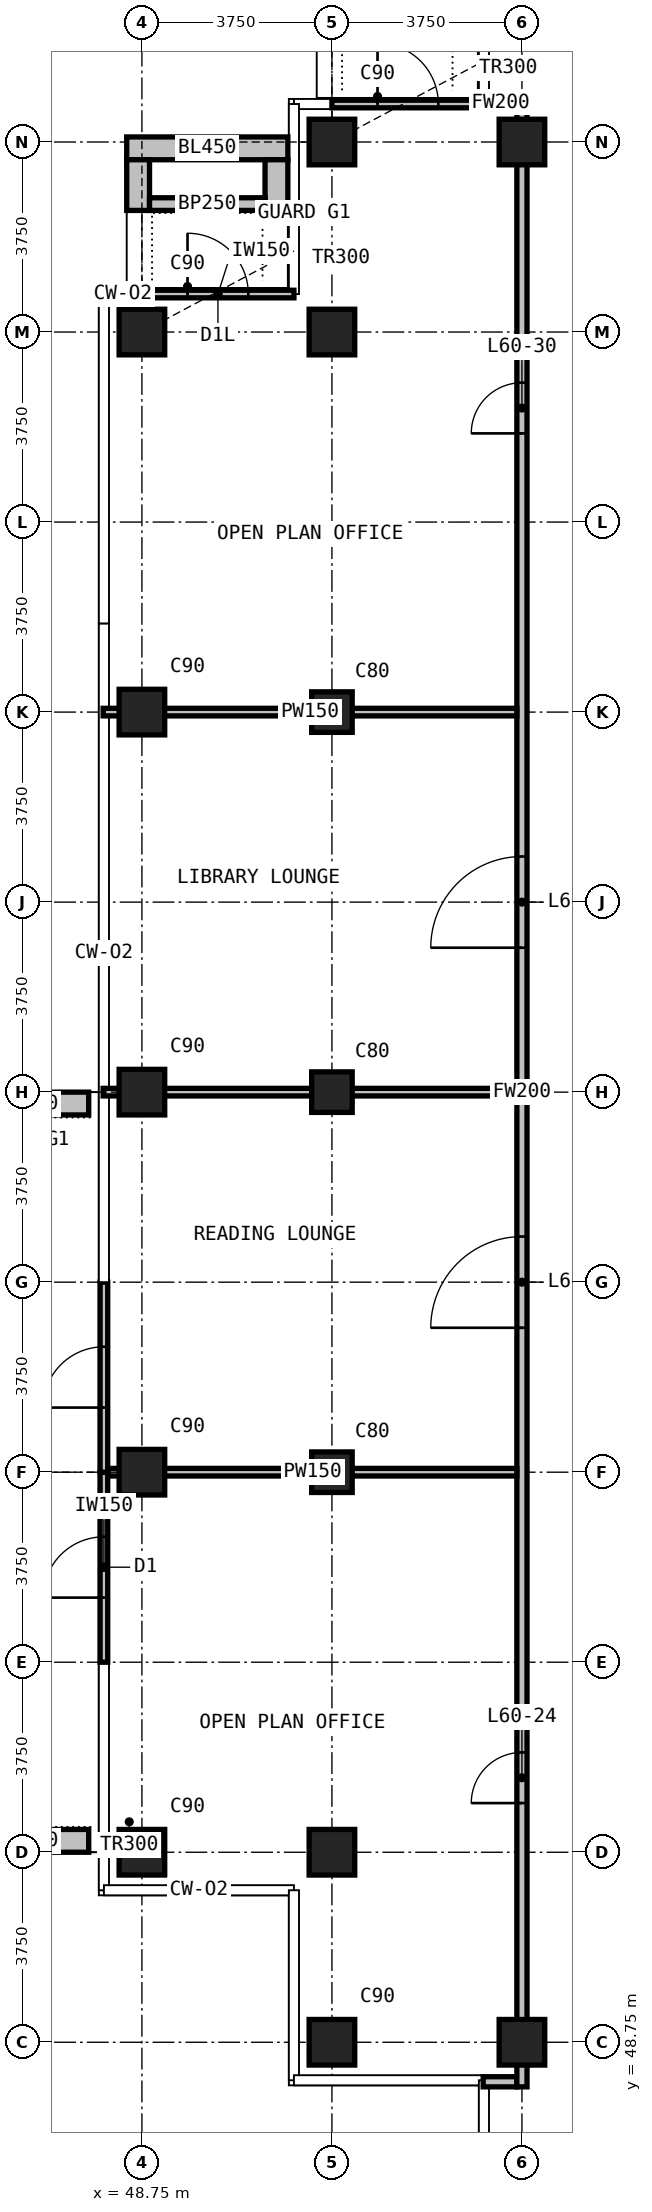
"""IFC4 building model, lengths in metres.
Left out: names, types, materials, properties, quantities, classifications, styles, units other than length and angle.
Written with IfcOpenShell. Run it as: python <this file> out.ifc"""

import sys

from ifc_helpers import new_model, si_unit, direction, frame, frame_2d, origin, origin_2d, place, context, subcontext, project, spatial, rectangle, extrude, element, fill, save


model = new_model("IFC4")
c1 = context("Model", 3, precision=1e-05, world=origin(), true_north=direction((0.0, 1.0)))
c2 = subcontext(c1, "Body", "Model", "MODEL_VIEW")
j1 = project(units=[si_unit("LENGTHUNIT", "METRE"), si_unit("PLANEANGLEUNIT", "RADIAN")], contexts=[c1])
p1 = place(None, origin())
s1 = spatial("IfcSite", under=j1, at=p1, CompositionType="ELEMENT")
p2 = place(p1, origin())
s2 = spatial("IfcBuilding", under=s1, at=p2, CompositionType="ELEMENT")
p3 = place(p2, frame((0.0, 0.0, 231.9)))
s3 = spatial("IfcBuildingStorey", under=s2, at=p3, CompositionType="ELEMENT", Elevation=231.9)
for number, where, z_axis, x_axis in (
    (1, (48.75, 52.5, 0.0), (0.0, 0.0, 1.0), (1.0, 0.0, 0.0)),
    (2, (48.75, 60.0, 0.0), (0.0, 0.0, 1.0), (1.0, 0.0, 0.0)),
    (3, (48.75, 67.5, 0.0), (0.0, 0.0, 1.0), (1.0, 0.0, 0.0)),
    (4, (48.75, 75.0, 0.0), (0.0, 0.0, 1.0), (1.0, 0.0, 0.0)),
    (5, (48.75, 82.5, 0.0), (0.0, 0.0, 1.0), (1.0, 0.0, 0.0)),
    (6, (52.5, 48.75, 0.0), (0.0, 0.0, 1.0), (1.0, 0.0, 0.0)),
    (7, (52.5, 52.5, 0.0), (0.0, 0.0, 1.0), (1.0, 0.0, 0.0)),
):
    element("IfcColumn", number, at=place(p3, frame(where, z_axis=z_axis, x_axis=x_axis)), inside=s3, PredefinedType="COLUMN", context=c2, shape_type="SweptSolid", body=[
        extrude(rectangle(XDim=0.9, YDim=0.9, at=origin_2d()), origin(), (0.0, 0.0, 1.0), 3.6),
    ])
for number, where, z_axis, x_axis in (
    (8, (52.5, 60.0, 0.0), (0.0, 0.0, 1.0), (1.0, 0.0, 0.0)),
    (9, (52.5, 67.5, 0.0), (0.0, 0.0, 1.0), (1.0, 0.0, 0.0)),
    (10, (52.5, 75.0, 0.0), (0.0, 0.0, 1.0), (1.0, 0.0, 0.0)),
):
    element("IfcColumn", number, at=place(p3, frame(where, z_axis=z_axis, x_axis=x_axis)), inside=s3, PredefinedType="COLUMN", context=c2, shape_type="SweptSolid", body=[
        extrude(rectangle(XDim=0.8, YDim=0.8, at=origin_2d()), origin(), (0.0, 0.0, 1.0), 3.6),
    ])
for number, where, z_axis, x_axis in (
    (11, (52.5, 82.5, 0.0), (0.0, 0.0, 1.0), (1.0, 0.0, 0.0)),
    (12, (52.5, 86.25, 0.0), (0.0, 0.0, 1.0), (1.0, 0.0, 0.0)),
    (13, (56.25, 48.75, 0.0), (0.0, 0.0, 1.0), (1.0, 0.0, 0.0)),
    (14, (56.25, 86.25, 0.0), (0.0, 0.0, 1.0), (1.0, 0.0, 0.0)),
):
    element("IfcColumn", number, at=place(p3, frame(where, z_axis=z_axis, x_axis=x_axis)), inside=s3, PredefinedType="COLUMN", context=c2, shape_type="SweptSolid", body=[
        extrude(rectangle(XDim=0.9, YDim=0.9, at=origin_2d()), origin(), (0.0, 0.0, 1.0), 3.6),
    ])
p4 = place(p3, frame((52.5, 87.0, 0.0), z_axis=(0.0, 0.0, 1.0), x_axis=(1.0, 0.0, 0.0)))
e15 = element("IfcWall", 15, at=p4, inside=s3, PredefinedType="SOLIDWALL", context=c2, shape_type="SweptSolid", body=[
    extrude(rectangle(XDim=3.0, YDim=0.15, at=frame_2d((1.5, 0.0))), origin(), (0.0, 0.0, 1.0), 3.3),
])
p5 = place(p4, frame((0.9, 0.0, 0.0)))
e16 = element("IfcOpeningElement", 16, at=p5, cuts=e15, PredefinedType="OPENING", context=c2, shape_type="SweptSolid", body=[
    extrude(rectangle(XDim=1.2, YDim=2.0, at=frame_2d((0.6, 1.0))), frame((0.0, 0.085, 0.0), z_axis=(0.0, -1.0, 0.0), x_axis=(1.0, 0.0, 0.0)), (0.0, 0.0, 1.0), 0.17),
])
p6 = place(p3, frame((48.75, 83.25, 0.0), z_axis=(0.0, 0.0, 1.0), x_axis=(1.0, 0.0, 0.0)))
e17 = element("IfcWall", 17, at=p6, inside=s3, PredefinedType="SOLIDWALL", context=c2, shape_type="SweptSolid", body=[
    extrude(rectangle(XDim=3.0, YDim=0.15, at=frame_2d((1.5, 0.0))), origin(), (0.0, 0.0, 1.0), 3.3),
])
p7 = place(p6, frame((0.9, 0.0, 0.0)))
e18 = element("IfcOpeningElement", 18, at=p7, cuts=e17, PredefinedType="OPENING", context=c2, shape_type="SweptSolid", body=[
    extrude(rectangle(XDim=1.2, YDim=2.0, at=frame_2d((0.6, 1.0))), frame((0.0, 0.085, 0.0), z_axis=(0.0, -1.0, 0.0), x_axis=(1.0, 0.0, 0.0)), (0.0, 0.0, 1.0), 0.17),
])
p8 = place(p3, frame((48.0, 56.25, 0.0), z_axis=(0.0, 0.0, 1.0), x_axis=(0.0, 1.0, 0.0)))
e19 = element("IfcWall", 19, at=p8, inside=s3, PredefinedType="SOLIDWALL", context=c2, shape_type="SweptSolid", body=[
    extrude(rectangle(XDim=3.75, YDim=0.15, at=frame_2d((1.875, 0.0))), origin(), (0.0, 0.0, 1.0), 3.3),
])
p9 = place(p8, frame((1.275, 0.0, 0.0)))
e20 = element("IfcOpeningElement", 20, at=p9, cuts=e19, PredefinedType="OPENING", context=c2, shape_type="SweptSolid", body=[
    extrude(rectangle(XDim=1.2, YDim=2.4, at=frame_2d((0.6, 1.2))), frame((0.0, 0.085, 0.0), z_axis=(0.0, -1.0, 0.0), x_axis=(1.0, 0.0, 0.0)), (0.0, 0.0, 1.0), 0.17),
])
p10 = place(p3, frame((48.0, 60.0, 0.0), z_axis=(0.0, 0.0, 1.0), x_axis=(0.0, 1.0, 0.0)))
e21 = element("IfcWall", 21, at=p10, inside=s3, PredefinedType="SOLIDWALL", context=c2, shape_type="SweptSolid", body=[
    extrude(rectangle(XDim=3.75, YDim=0.15, at=frame_2d((1.875, 0.0))), origin(), (0.0, 0.0, 1.0), 3.3),
])
p11 = place(p10, frame((1.275, 0.0, 0.0)))
e22 = element("IfcOpeningElement", 22, at=p11, cuts=e21, PredefinedType="OPENING", context=c2, shape_type="SweptSolid", body=[
    extrude(rectangle(XDim=1.2, YDim=2.4, at=frame_2d((0.6, 1.2))), frame((0.0, 0.085, 0.0), z_axis=(0.0, -1.0, 0.0), x_axis=(1.0, 0.0, 0.0)), (0.0, 0.0, 1.0), 0.17),
])
p12 = place(p3, frame((48.45, 86.125, 0.0), z_axis=(0.0, 0.0, 1.0), x_axis=(1.0, 0.0, 0.0)))
e23 = element("IfcWall", 23, at=p12, inside=s3, PredefinedType="USERDEFINED", context=c2, shape_type="SweptSolid", body=[
    extrude(rectangle(XDim=3.18, YDim=0.45, at=frame_2d((1.59, 0.0))), origin(), (0.0, 0.0, 1.0), 1.1),
])
for number, where, z_axis, x_axis in (
    (24, (48.675, 84.9, 0.0), (0.0, 0.0, 1.0), (0.0, 1.0, 0.0)),
    (25, (51.405, 84.9, 0.0), (0.0, 0.0, 1.0), (0.0, 1.0, 0.0)),
):
    element("IfcWall", number, at=place(p3, frame(where, z_axis=z_axis, x_axis=x_axis)), inside=s3, PredefinedType="USERDEFINED", context=c2, shape_type="SweptSolid", body=[
        extrude(rectangle(XDim=1.0, YDim=0.45, at=frame_2d((0.5, 0.0))), origin(), (0.0, 0.0, 1.0), 1.1),
    ])
p13 = place(p3, frame((48.9, 85.025, 0.0), z_axis=(0.0, 0.0, 1.0), x_axis=(1.0, 0.0, 0.0)))
e26 = element("IfcWall", 26, at=p13, inside=s3, PredefinedType="USERDEFINED", context=c2, shape_type="SweptSolid", body=[
    extrude(rectangle(XDim=2.28, YDim=0.25, at=frame_2d((1.14, 0.0))), origin(), (0.0, 0.0, 1.0), 1.0),
])
for number, where, z_axis, x_axis in (
    (27, (47.7, 52.725, 0.0), (0.0, 0.0, 1.0), (-1.0, 0.0, 0.0)),
    (28, (47.7, 67.275, 0.0), (0.0, 0.0, 1.0), (-1.0, 0.0, 0.0)),
):
    element("IfcWall", number, at=place(p3, frame(where, z_axis=z_axis, x_axis=x_axis)), inside=s3, PredefinedType="USERDEFINED", context=c2, shape_type="SweptSolid", body=[
        extrude(rectangle(XDim=2.35, YDim=0.45, at=frame_2d((1.175, 0.0))), origin(), (0.0, 0.0, 1.0), 1.1),
    ])
p14 = place(p3, frame((55.485, 47.97, 0.0), z_axis=(0.0, 0.0, 1.0), x_axis=(1.0, 0.0, 0.0)))
e29 = element("IfcWall", 29, at=p14, inside=s3, PredefinedType="PARTITIONING", context=c2, shape_type="SweptSolid", body=[
    extrude(rectangle(XDim=0.665, YDim=0.2, at=frame_2d((0.333, 0.0))), origin(), (0.0, 0.0, 1.0), 3.3),
])
p15 = place(p3, frame((55.51, 87.03, 0.0), z_axis=(0.0, 0.0, 1.0), x_axis=(1.0, 0.0, 0.0)))
e30 = element("IfcWall", 30, at=p15, inside=s3, PredefinedType="PARTITIONING", context=c2, shape_type="SweptSolid", body=[
    extrude(rectangle(XDim=0.64, YDim=0.2, at=frame_2d((0.32, 0.0))), origin(), (0.0, 0.0, 1.0), 3.3),
])
p16 = place(p3, frame((56.25, 47.87, 0.0), z_axis=(0.0, 0.0, 1.0), x_axis=(0.0, 1.0, 0.0)))
e31 = element("IfcWall", 31, at=p16, inside=s3, PredefinedType="PARTITIONING", context=c2, shape_type="SweptSolid", body=[
    extrude(rectangle(XDim=39.26, YDim=0.2, at=frame_2d((19.63, 0.0))), origin(), (0.0, 0.0, 1.0), 3.3),
])
p17 = place(p16, frame((5.6, 0.0, 0.0)))
e32 = element("IfcOpeningElement", 32, at=p17, cuts=e31, PredefinedType="OPENING", context=c2, shape_type="SweptSolid", body=[
    extrude(rectangle(XDim=1.0, YDim=2.2, at=frame_2d((0.5, 1.1))), frame((0.0, 0.11, 0.0), z_axis=(0.0, -1.0, 0.0), x_axis=(1.0, 0.0, 0.0)), (0.0, 0.0, 1.0), 0.22),
])
p18 = place(p16, frame((14.98, 0.0, 0.0)))
e33 = element("IfcOpeningElement", 33, at=p18, cuts=e31, PredefinedType="OPENING", context=c2, shape_type="SweptSolid", body=[
    extrude(rectangle(XDim=1.8, YDim=2.2, at=frame_2d((0.9, 1.1))), frame((0.0, 0.11, 0.0), z_axis=(0.0, -1.0, 0.0), x_axis=(1.0, 0.0, 0.0)), (0.0, 0.0, 1.0), 0.22),
])
p19 = place(p16, frame((22.48, 0.0, 0.0)))
e34 = element("IfcOpeningElement", 34, at=p19, cuts=e31, PredefinedType="OPENING", context=c2, shape_type="SweptSolid", body=[
    extrude(rectangle(XDim=1.8, YDim=2.2, at=frame_2d((0.9, 1.1))), frame((0.0, 0.11, 0.0), z_axis=(0.0, -1.0, 0.0), x_axis=(1.0, 0.0, 0.0)), (0.0, 0.0, 1.0), 0.22),
])
p20 = place(p16, frame((32.63, 0.0, 0.0)))
e35 = element("IfcOpeningElement", 35, at=p20, cuts=e31, PredefinedType="OPENING", context=c2, shape_type="SweptSolid", body=[
    extrude(rectangle(XDim=1.0, YDim=2.2, at=frame_2d((0.5, 1.1))), frame((0.0, 0.11, 0.0), z_axis=(0.0, -1.0, 0.0), x_axis=(1.0, 0.0, 0.0)), (0.0, 0.0, 1.0), 0.22),
])
p21 = place(p3, frame((48.085, 60.0, 0.0), z_axis=(0.0, 0.0, 1.0), x_axis=(1.0, 0.0, 0.0)))
e36 = element("IfcWall", 36, at=p21, inside=s3, PredefinedType="PARTITIONING", context=c2, shape_type="SweptSolid", body=[
    extrude(rectangle(XDim=8.065, YDim=0.15, at=frame_2d((4.032, 0.0))), origin(), (0.0, 0.0, 1.0), 3.3),
])
for number, where, z_axis, x_axis in (
    (37, (47.985, 67.5, 0.0), (0.0, 0.0, 1.0), (1.0, 0.0, 0.0)),
    (38, (47.985, 75.0, 0.0), (0.0, 0.0, 1.0), (1.0, 0.0, 0.0)),
):
    element("IfcWall", number, at=place(p3, frame(where, z_axis=z_axis, x_axis=x_axis)), inside=s3, PredefinedType="PARTITIONING", context=c2, shape_type="SweptSolid", body=[
        extrude(rectangle(XDim=8.165, YDim=0.15, at=frame_2d((4.083, 0.0))), origin(), (0.0, 0.0, 1.0), 3.3),
    ])
p22 = place(p5, origin())
e39 = element("IfcDoor", 39, at=p22, inside=s3, OperationType="SINGLE_SWING_LEFT", PredefinedType="DOOR", context=c2, shape_type="SweptSolid", body=[
    extrude(rectangle(XDim=1.2, YDim=2.0, at=frame_2d((0.6, 1.0))), frame((0.0, 0.025, 0.0), z_axis=(0.0, -1.0, 0.0), x_axis=(1.0, 0.0, 0.0)), (0.0, 0.0, 1.0), 0.05),
])
fill(e16, e39)
p23 = place(p7, origin())
e40 = element("IfcDoor", 40, at=p23, inside=s3, OperationType="SINGLE_SWING_LEFT", PredefinedType="DOOR", context=c2, shape_type="SweptSolid", body=[
    extrude(rectangle(XDim=1.2, YDim=2.0, at=frame_2d((0.6, 1.0))), frame((0.0, 0.025, 0.0), z_axis=(0.0, -1.0, 0.0), x_axis=(1.0, 0.0, 0.0)), (0.0, 0.0, 1.0), 0.05),
])
fill(e18, e40)
p24 = place(p9, origin())
e41 = element("IfcDoor", 41, at=p24, inside=s3, OperationType="SINGLE_SWING_LEFT", PredefinedType="DOOR", context=c2, shape_type="SweptSolid", body=[
    extrude(rectangle(XDim=1.2, YDim=2.4, at=frame_2d((0.6, 1.2))), frame((0.0, 0.025, 0.0), z_axis=(0.0, -1.0, 0.0), x_axis=(1.0, 0.0, 0.0)), (0.0, 0.0, 1.0), 0.05),
])
fill(e20, e41)
p25 = place(p11, origin())
e42 = element("IfcDoor", 42, at=p25, inside=s3, OperationType="SINGLE_SWING_LEFT", PredefinedType="DOOR", context=c2, shape_type="SweptSolid", body=[
    extrude(rectangle(XDim=1.2, YDim=2.4, at=frame_2d((0.6, 1.2))), frame((0.0, 0.025, 0.0), z_axis=(0.0, -1.0, 0.0), x_axis=(1.0, 0.0, 0.0)), (0.0, 0.0, 1.0), 0.05),
])
fill(e22, e42)
p26 = place(p17, origin())
e43 = element("IfcDoor", 43, at=p26, inside=s3, OperationType="SINGLE_SWING_LEFT", PredefinedType="DOOR", context=c2, shape_type="SweptSolid", body=[
    extrude(rectangle(XDim=1.0, YDim=2.2, at=frame_2d((0.5, 1.1))), frame((0.0, 0.025, 0.0), z_axis=(0.0, -1.0, 0.0), x_axis=(1.0, 0.0, 0.0)), (0.0, 0.0, 1.0), 0.05),
])
fill(e32, e43)
p27 = place(p18, origin())
e44 = element("IfcDoor", 44, at=p27, inside=s3, OperationType="DOUBLE_DOOR_SINGLE_SWING", PredefinedType="DOOR", context=c2, shape_type="SweptSolid", body=[
    extrude(rectangle(XDim=1.8, YDim=2.2, at=frame_2d((0.9, 1.1))), frame((0.0, 0.025, 0.0), z_axis=(0.0, -1.0, 0.0), x_axis=(1.0, 0.0, 0.0)), (0.0, 0.0, 1.0), 0.05),
])
fill(e33, e44)
p28 = place(p19, origin())
e45 = element("IfcDoor", 45, at=p28, inside=s3, OperationType="DOUBLE_DOOR_SINGLE_SWING", PredefinedType="DOOR", context=c2, shape_type="SweptSolid", body=[
    extrude(rectangle(XDim=1.8, YDim=2.2, at=frame_2d((0.9, 1.1))), frame((0.0, 0.025, 0.0), z_axis=(0.0, -1.0, 0.0), x_axis=(1.0, 0.0, 0.0)), (0.0, 0.0, 1.0), 0.05),
])
fill(e34, e45)
p29 = place(p20, origin())
e46 = element("IfcDoor", 46, at=p29, inside=s3, OperationType="SINGLE_SWING_LEFT", PredefinedType="DOOR", context=c2, shape_type="SweptSolid", body=[
    extrude(rectangle(XDim=1.0, YDim=2.2, at=frame_2d((0.5, 1.1))), frame((0.0, 0.025, 0.0), z_axis=(0.0, -1.0, 0.0), x_axis=(1.0, 0.0, 0.0)), (0.0, 0.0, 1.0), 0.05),
])
fill(e35, e46)
save(model, sys.argv[1])
